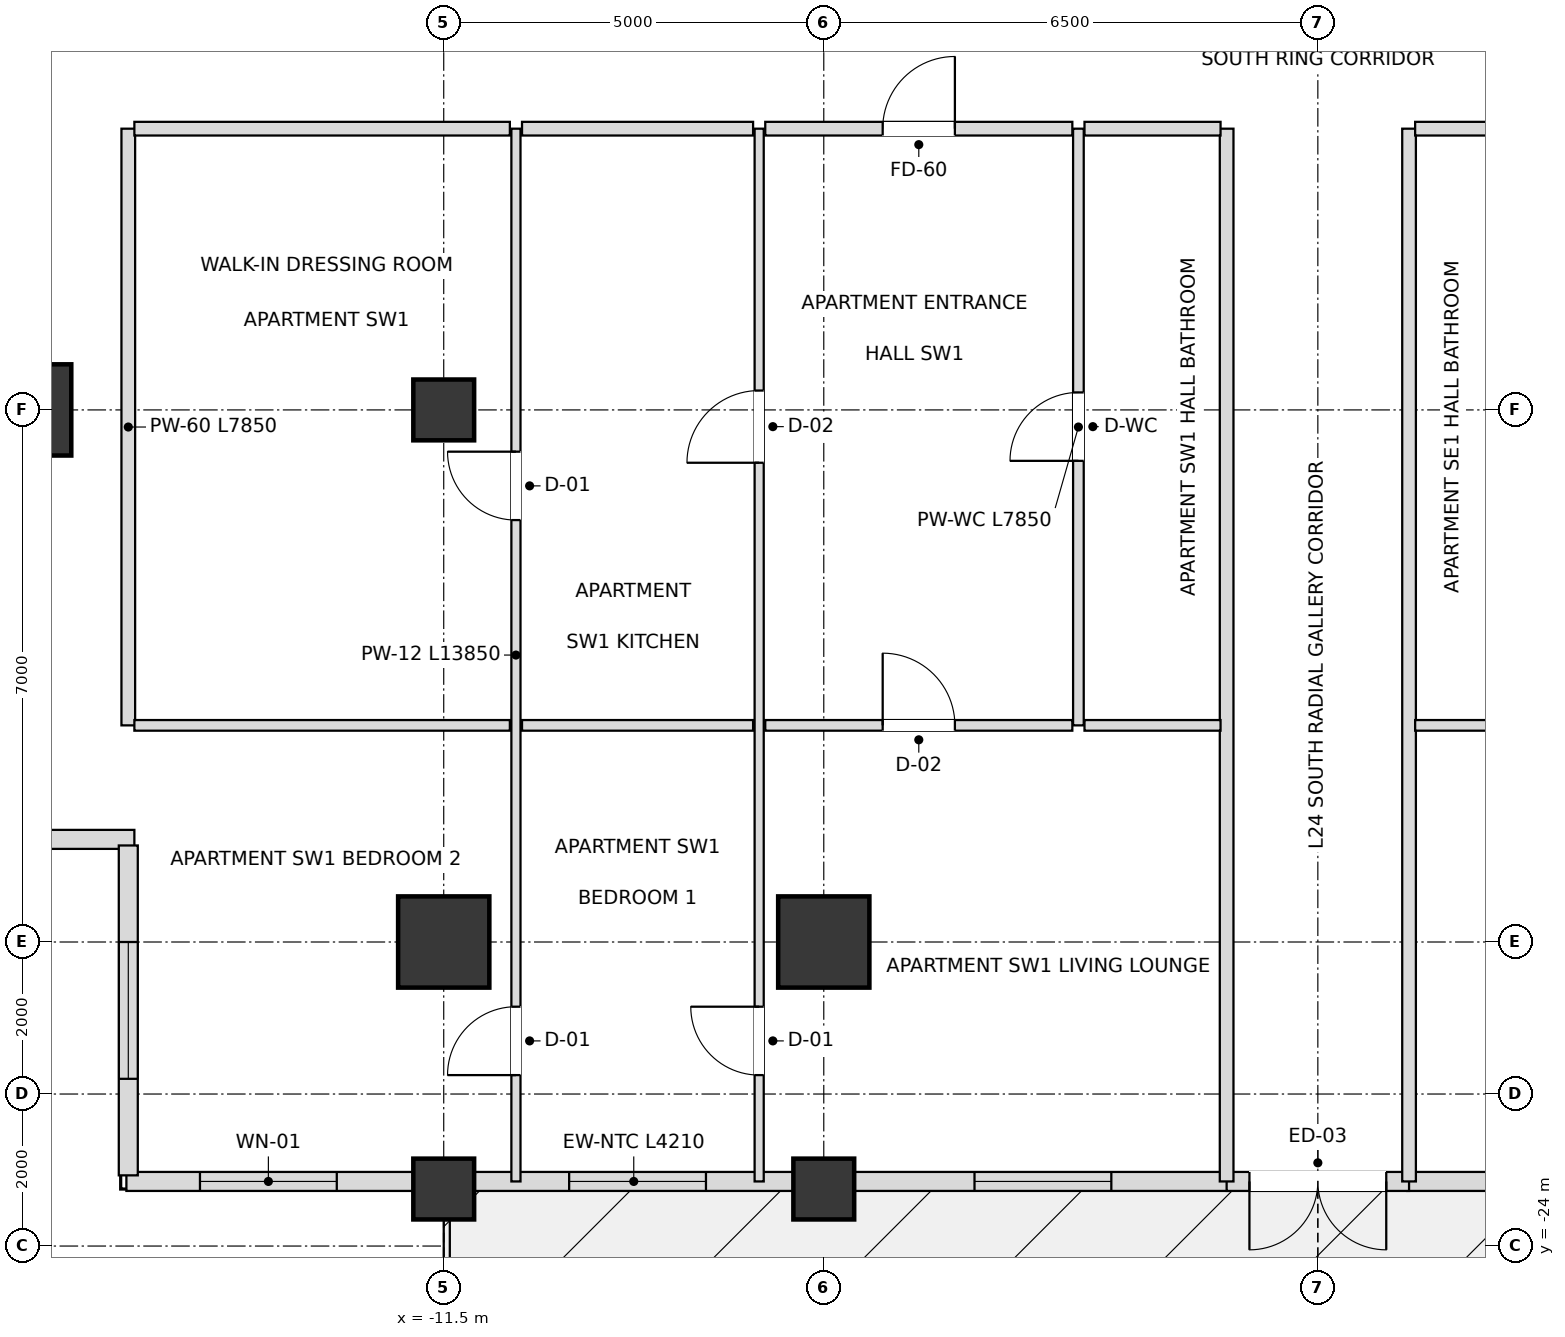
"""IFC4 building model, lengths in metres.
Left out: names, types, materials, properties, quantities, classifications, styles, units other than length and angle.
Written with IfcOpenShell. Run it as: python <this file> out.ifc"""

import sys

from ifc_helpers import new_model, si_unit, direction, frame, frame_2d, origin, origin_2d, place, context, subcontext, project, spatial, rectangle, extrude, element, fill, save


model = new_model("IFC4")
c1 = context("Model", 3, precision=1e-05, world=origin(), true_north=direction((0.0, 1.0)))
c2 = subcontext(c1, "Body", "Model", "MODEL_VIEW")
j1 = project(units=[si_unit("LENGTHUNIT", "METRE"), si_unit("PLANEANGLEUNIT", "RADIAN")], contexts=[c1])
p1 = place(None, origin())
s1 = spatial("IfcSite", under=j1, at=p1, CompositionType="ELEMENT")
p2 = place(p1, origin())
s2 = spatial("IfcBuilding", under=s1, at=p2, CompositionType="ELEMENT")
p3 = place(p2, frame((0.0, 0.0, 99.0)))
s3 = spatial("IfcBuildingStorey", under=s2, at=p3, CompositionType="ELEMENT", Elevation=99.0)
for number, where, z_axis, x_axis in (
    (1, (-11.5, -20.0, 0.0), (0.0, 0.0, 1.0), (1.0, 0.0, 0.0)),
    (2, (-6.5, -20.0, 0.0), (0.0, 0.0, 1.0), (1.0, 0.0, 0.0)),
    (3, (-17.0, -13.0, 0.0), (0.0, 0.0, 1.0), (1.0, 0.0, 0.0)),
):
    element("IfcColumn", number, at=place(p3, frame(where, z_axis=z_axis, x_axis=x_axis)), inside=s3, PredefinedType="USERDEFINED", context=c2, shape_type="SweptSolid", body=[
        extrude(rectangle(XDim=1.2, YDim=1.2, at=origin_2d()), origin(), (0.0, 0.0, 1.0), 3.6),
    ])
for number, where, z_axis, x_axis in (
    (4, (-11.5, -13.0, 0.0), (0.0, 0.0, 1.0), (1.0, 0.0, 0.0)),
    (5, (-11.5, -23.25, 0.0), (0.0, 0.0, 1.0), (1.0, 0.0, 0.0)),
    (6, (-6.5, -23.25, 0.0), (0.0, 0.0, 1.0), (1.0, 0.0, 0.0)),
):
    element("IfcColumn", number, at=place(p3, frame(where, z_axis=z_axis, x_axis=x_axis)), inside=s3, PredefinedType="COLUMN", context=c2, shape_type="SweptSolid", body=[
        extrude(rectangle(XDim=0.8, YDim=0.8, at=origin_2d()), origin(), (0.0, 0.0, 1.0), 3.6),
    ])
p4 = place(p3, frame((-15.675, -23.15, 0.0), z_axis=(0.0, 0.0, 1.0), x_axis=(1.0, 0.0, 0.0)))
e7 = element("IfcWall", 7, at=p4, inside=s3, PredefinedType="SOLIDWALL", context=c2, shape_type="SweptSolid", body=[
    extrude(rectangle(XDim=3.78, YDim=0.25, at=frame_2d((1.89, 0.0))), origin(), (0.0, 0.0, 1.0), 2.736),
])
p5 = place(p4, frame((0.968, 0.0, 0.72)))
e8 = element("IfcOpeningElement", 8, at=p5, cuts=e7, PredefinedType="OPENING", context=c2, shape_type="SweptSolid", body=[
    extrude(rectangle(XDim=1.8, YDim=1.68, at=frame_2d((0.9, 0.84))), frame((0.0, 0.135, 0.0), z_axis=(0.0, -1.0, 0.0), x_axis=(1.0, 0.0, 0.0)), (0.0, 0.0, 1.0), 0.27),
])
p6 = place(p3, frame((-11.105, -23.15, 0.0), z_axis=(0.0, 0.0, 1.0), x_axis=(1.0, 0.0, 0.0)))
e9 = element("IfcWall", 9, at=p6, inside=s3, PredefinedType="SOLIDWALL", context=c2, shape_type="SweptSolid", body=[
    extrude(rectangle(XDim=4.21, YDim=0.25, at=frame_2d((2.105, 0.0))), origin(), (0.0, 0.0, 1.0), 2.736),
])
p7 = place(p6, frame((1.255, 0.0, 0.72)))
e10 = element("IfcOpeningElement", 10, at=p7, cuts=e9, PredefinedType="OPENING", context=c2, shape_type="SweptSolid", body=[
    extrude(rectangle(XDim=1.8, YDim=1.68, at=frame_2d((0.9, 0.84))), frame((0.0, 0.135, 0.0), z_axis=(0.0, -1.0, 0.0), x_axis=(1.0, 0.0, 0.0)), (0.0, 0.0, 1.0), 0.27),
])
p8 = place(p3, frame((-6.105, -23.15, 0.0), z_axis=(0.0, 0.0, 1.0), x_axis=(1.0, 0.0, 0.0)))
e11 = element("IfcWall", 11, at=p8, inside=s3, PredefinedType="SOLIDWALL", context=c2, shape_type="SweptSolid", body=[
    extrude(rectangle(XDim=4.93, YDim=0.25, at=frame_2d((2.465, 0.0))), origin(), (0.0, 0.0, 1.0), 2.736),
])
p9 = place(p8, frame((1.588, 0.0, 0.72)))
e12 = element("IfcOpeningElement", 12, at=p9, cuts=e11, PredefinedType="OPENING", context=c2, shape_type="SweptSolid", body=[
    extrude(rectangle(XDim=1.8, YDim=1.68, at=frame_2d((0.9, 0.84))), frame((0.0, 0.135, 0.0), z_axis=(0.0, -1.0, 0.0), x_axis=(1.0, 0.0, 0.0)), (0.0, 0.0, 1.0), 0.27),
])
p10 = place(p3, frame((1.175, -23.15, 0.0), z_axis=(0.0, 0.0, 1.0), x_axis=(1.0, 0.0, 0.0)))
e13 = element("IfcWall", 13, at=p10, inside=s3, PredefinedType="SOLIDWALL", context=c2, shape_type="SweptSolid", body=[
    extrude(rectangle(XDim=4.93, YDim=0.25, at=frame_2d((2.465, 0.0))), origin(), (0.0, 0.0, 1.0), 2.736),
])
p11 = place(p10, frame((1.543, 0.0, 0.72)))
e14 = element("IfcOpeningElement", 14, at=p11, cuts=e13, PredefinedType="OPENING", context=c2, shape_type="SweptSolid", body=[
    extrude(rectangle(XDim=1.8, YDim=1.68, at=frame_2d((0.9, 0.84))), frame((0.0, 0.135, 0.0), z_axis=(0.0, -1.0, 0.0), x_axis=(1.0, 0.0, 0.0)), (0.0, 0.0, 1.0), 0.27),
])
p12 = place(p3, frame((1.2, -23.15, 0.0), z_axis=(0.0, 0.0, 1.0), x_axis=(-1.0, 0.0, 0.0)))
e15 = element("IfcWall", 15, at=p12, inside=s3, PredefinedType="SOLIDWALL", context=c2, shape_type="SweptSolid", body=[
    extrude(rectangle(XDim=2.4, YDim=0.25, at=frame_2d((1.2, 0.0))), origin(), (0.0, 0.0, 1.0), 2.736),
])
p13 = place(p12, frame((0.3, 0.0, 0.0)))
e16 = element("IfcOpeningElement", 16, at=p13, cuts=e15, PredefinedType="OPENING", context=c2, shape_type="SweptSolid", body=[
    extrude(rectangle(XDim=1.8, YDim=2.3, at=frame_2d((0.9, 1.15))), frame((0.0, 0.135, 0.0), z_axis=(0.0, -1.0, 0.0), x_axis=(1.0, 0.0, 0.0)), (0.0, 0.0, 1.0), 0.27),
])
p14 = place(p3, frame((-20.23, -18.65, 0.0), z_axis=(0.0, 0.0, 1.0), x_axis=(1.0, 0.0, 0.0)))
e17 = element("IfcWall", 17, at=p14, inside=s3, PredefinedType="SOLIDWALL", context=c2, shape_type="SweptSolid", body=[
    extrude(rectangle(XDim=4.66, YDim=0.25, at=frame_2d((2.33, 0.0))), origin(), (0.0, 0.0, 1.0), 2.736),
])
p15 = place(p14, frame((1.43, 0.0, 0.72)))
e18 = element("IfcOpeningElement", 18, at=p15, cuts=e17, PredefinedType="OPENING", context=c2, shape_type="SweptSolid", body=[
    extrude(rectangle(XDim=1.8, YDim=1.68, at=frame_2d((0.9, 0.84))), frame((0.0, 0.135, 0.0), z_axis=(0.0, -1.0, 0.0), x_axis=(1.0, 0.0, 0.0)), (0.0, 0.0, 1.0), 0.27),
])
p16 = place(p3, frame((-15.65, -18.73, 0.0), z_axis=(0.0, 0.0, 1.0), x_axis=(0.0, -1.0, 0.0)))
e19 = element("IfcWall", 19, at=p16, inside=s3, PredefinedType="SOLIDWALL", context=c2, shape_type="SweptSolid", body=[
    extrude(rectangle(XDim=4.34, YDim=0.25, at=frame_2d((2.17, 0.0))), origin(), (0.0, 0.0, 1.0), 2.736),
])
p17 = place(p16, frame((1.27, 0.0, 0.72)))
e20 = element("IfcOpeningElement", 20, at=p17, cuts=e19, PredefinedType="OPENING", context=c2, shape_type="SweptSolid", body=[
    extrude(rectangle(XDim=1.8, YDim=1.68, at=frame_2d((0.9, 0.84))), frame((0.0, 0.135, 0.0), z_axis=(0.0, -1.0, 0.0), x_axis=(1.0, 0.0, 0.0)), (0.0, 0.0, 1.0), 0.27),
])
p18 = place(p3, frame((-15.65, -17.15, 0.0), z_axis=(0.0, 0.0, 1.0), x_axis=(0.0, 1.0, 0.0)))
e21 = element("IfcWall", 21, at=p18, inside=s3, PredefinedType="PARTITIONING", context=c2, shape_type="SweptSolid", body=[
    extrude(rectangle(XDim=7.85, YDim=0.18, at=frame_2d((3.925, 0.0))), origin(), (0.0, 0.0, 1.0), 2.736),
])
p19 = place(p3, frame((-10.55, -23.15, 0.0), z_axis=(0.0, 0.0, 1.0), x_axis=(0.0, 1.0, 0.0)))
e22 = element("IfcWall", 22, at=p19, inside=s3, PredefinedType="PARTITIONING", context=c2, shape_type="SweptSolid", body=[
    extrude(rectangle(XDim=13.85, YDim=0.12, at=frame_2d((6.925, 0.0))), origin(), (0.0, 0.0, 1.0), 2.816),
])
p20 = place(p19, frame((8.701, 0.0, 0.0)))
e23 = element("IfcOpeningElement", 23, at=p20, cuts=e22, PredefinedType="OPENING", context=c2, shape_type="SweptSolid", body=[
    extrude(rectangle(XDim=0.9, YDim=2.1, at=frame_2d((0.45, 1.05))), frame((0.0, 0.07, 0.0), z_axis=(0.0, -1.0, 0.0), x_axis=(1.0, 0.0, 0.0)), (0.0, 0.0, 1.0), 0.14),
])
p21 = place(p19, frame((1.399, 0.0, 0.0)))
e24 = element("IfcOpeningElement", 24, at=p21, cuts=e22, PredefinedType="OPENING", context=c2, shape_type="SweptSolid", body=[
    extrude(rectangle(XDim=0.9, YDim=2.1, at=frame_2d((0.45, 1.05))), frame((0.0, 0.07, 0.0), z_axis=(0.0, -1.0, 0.0), x_axis=(1.0, 0.0, 0.0)), (0.0, 0.0, 1.0), 0.14),
])
p22 = place(p3, frame((-7.35, -23.15, 0.0), z_axis=(0.0, 0.0, 1.0), x_axis=(0.0, 1.0, 0.0)))
e25 = element("IfcWall", 25, at=p22, inside=s3, PredefinedType="PARTITIONING", context=c2, shape_type="SweptSolid", body=[
    extrude(rectangle(XDim=13.85, YDim=0.12, at=frame_2d((6.925, 0.0))), origin(), (0.0, 0.0, 1.0), 2.816),
])
p23 = place(p22, frame((9.455, 0.0, 0.0)))
e26 = element("IfcOpeningElement", 26, at=p23, cuts=e25, PredefinedType="OPENING", context=c2, shape_type="SweptSolid", body=[
    extrude(rectangle(XDim=0.95, YDim=2.1, at=frame_2d((0.475, 1.05))), frame((0.0, 0.07, 0.0), z_axis=(0.0, -1.0, 0.0), x_axis=(1.0, 0.0, 0.0)), (0.0, 0.0, 1.0), 0.14),
])
p24 = place(p22, frame((1.399, 0.0, 0.0)))
e27 = element("IfcOpeningElement", 27, at=p24, cuts=e25, PredefinedType="OPENING", context=c2, shape_type="SweptSolid", body=[
    extrude(rectangle(XDim=0.9, YDim=2.1, at=frame_2d((0.45, 1.05))), frame((0.0, 0.07, 0.0), z_axis=(0.0, -1.0, 0.0), x_axis=(1.0, 0.0, 0.0)), (0.0, 0.0, 1.0), 0.14),
])
p25 = place(p3, frame((-3.15, -17.15, 0.0), z_axis=(0.0, 0.0, 1.0), x_axis=(0.0, 1.0, 0.0)))
e28 = element("IfcWall", 28, at=p25, inside=s3, PredefinedType="PARTITIONING", context=c2, shape_type="SweptSolid", body=[
    extrude(rectangle(XDim=7.85, YDim=0.14, at=frame_2d((3.925, 0.0))), origin(), (0.0, 0.0, 1.0), 3.38),
])
p26 = place(p25, frame((3.48, 0.0, 0.0)))
e29 = element("IfcOpeningElement", 29, at=p26, cuts=e28, PredefinedType="OPENING", context=c2, shape_type="SweptSolid", body=[
    extrude(rectangle(XDim=0.9, YDim=2.1, at=frame_2d((0.45, 1.05))), frame((0.0, 0.08, 0.0), z_axis=(0.0, -1.0, 0.0), x_axis=(1.0, 0.0, 0.0)), (0.0, 0.0, 1.0), 0.16),
])
for number, where, z_axis, x_axis in (
    (30, (-1.2, -23.15, 0.0), (0.0, 0.0, 1.0), (0.0, 1.0, 0.0)),
    (31, (1.2, -23.15, 0.0), (0.0, 0.0, 1.0), (0.0, 1.0, 0.0)),
):
    element("IfcWall", number, at=place(p3, frame(where, z_axis=z_axis, x_axis=x_axis)), inside=s3, PredefinedType="PARTITIONING", context=c2, shape_type="SweptSolid", body=[
        extrude(rectangle(XDim=13.85, YDim=0.18, at=frame_2d((6.925, 0.0))), origin(), (0.0, 0.0, 1.0), 2.816),
    ])
p27 = place(p3, frame((-15.57, -17.15, 0.0), z_axis=(0.0, 0.0, 1.0), x_axis=(1.0, 0.0, 0.0)))
e32 = element("IfcWall", 32, at=p27, inside=s3, PredefinedType="PARTITIONING", context=c2, shape_type="SweptSolid", body=[
    extrude(rectangle(XDim=4.94, YDim=0.14, at=frame_2d((2.47, 0.0))), origin(), (0.0, 0.0, 1.0), 2.736),
])
p28 = place(p3, frame((-10.47, -17.15, 0.0), z_axis=(0.0, 0.0, 1.0), x_axis=(1.0, 0.0, 0.0)))
e33 = element("IfcWall", 33, at=p28, inside=s3, PredefinedType="PARTITIONING", context=c2, shape_type="SweptSolid", body=[
    extrude(rectangle(XDim=3.04, YDim=0.14, at=frame_2d((1.52, 0.0))), origin(), (0.0, 0.0, 1.0), 3.38),
])
p29 = place(p3, frame((-7.27, -17.15, 0.0), z_axis=(0.0, 0.0, 1.0), x_axis=(1.0, 0.0, 0.0)))
e34 = element("IfcWall", 34, at=p29, inside=s3, PredefinedType="PARTITIONING", context=c2, shape_type="SweptSolid", body=[
    extrude(rectangle(XDim=4.04, YDim=0.14, at=frame_2d((2.02, 0.0))), origin(), (0.0, 0.0, 1.0), 2.816),
])
p30 = place(p29, frame((1.545, 0.0, 0.0)))
e35 = element("IfcOpeningElement", 35, at=p30, cuts=e34, PredefinedType="OPENING", context=c2, shape_type="SweptSolid", body=[
    extrude(rectangle(XDim=0.95, YDim=2.1, at=frame_2d((0.475, 1.05))), frame((0.0, 0.08, 0.0), z_axis=(0.0, -1.0, 0.0), x_axis=(1.0, 0.0, 0.0)), (0.0, 0.0, 1.0), 0.16),
])
for number, where, z_axis, x_axis in (
    (36, (-3.07, -17.15, 0.0), (0.0, 0.0, 1.0), (1.0, 0.0, 0.0)),
    (37, (1.28, -17.15, 0.0), (0.0, 0.0, 1.0), (1.0, 0.0, 0.0)),
):
    element("IfcWall", number, at=place(p3, frame(where, z_axis=z_axis, x_axis=x_axis)), inside=s3, PredefinedType="PARTITIONING", context=c2, shape_type="SweptSolid", body=[
        extrude(rectangle(XDim=1.79, YDim=0.14, at=frame_2d((0.895, 0.0))), origin(), (0.0, 0.0, 1.0), 3.38),
    ])
p31 = place(p3, frame((-15.57, -9.3, 0.0), z_axis=(0.0, 0.0, 1.0), x_axis=(1.0, 0.0, 0.0)))
e38 = element("IfcWall", 38, at=p31, inside=s3, PredefinedType="PARTITIONING", context=c2, shape_type="SweptSolid", body=[
    extrude(rectangle(XDim=4.94, YDim=0.18, at=frame_2d((2.47, 0.0))), origin(), (0.0, 0.0, 1.0), 3.38),
])
p32 = place(p3, frame((-10.47, -9.3, 0.0), z_axis=(0.0, 0.0, 1.0), x_axis=(1.0, 0.0, 0.0)))
e39 = element("IfcWall", 39, at=p32, inside=s3, PredefinedType="PARTITIONING", context=c2, shape_type="SweptSolid", body=[
    extrude(rectangle(XDim=3.04, YDim=0.18, at=frame_2d((1.52, 0.0))), origin(), (0.0, 0.0, 1.0), 3.38),
])
p33 = place(p3, frame((-7.27, -9.3, 0.0), z_axis=(0.0, 0.0, 1.0), x_axis=(1.0, 0.0, 0.0)))
e40 = element("IfcWall", 40, at=p33, inside=s3, PredefinedType="PARTITIONING", context=c2, shape_type="SweptSolid", body=[
    extrude(rectangle(XDim=4.04, YDim=0.18, at=frame_2d((2.02, 0.0))), origin(), (0.0, 0.0, 1.0), 2.816),
])
p34 = place(p33, frame((1.545, 0.0, 0.0)))
e41 = element("IfcOpeningElement", 41, at=p34, cuts=e40, PredefinedType="OPENING", context=c2, shape_type="SweptSolid", body=[
    extrude(rectangle(XDim=0.95, YDim=2.15, at=frame_2d((0.475, 1.075))), frame((0.0, 0.1, 0.0), z_axis=(0.0, -1.0, 0.0), x_axis=(1.0, 0.0, 0.0)), (0.0, 0.0, 1.0), 0.2),
])
for number, where, z_axis, x_axis in (
    (42, (-3.07, -9.3, 0.0), (0.0, 0.0, 1.0), (1.0, 0.0, 0.0)),
    (43, (1.28, -9.3, 0.0), (0.0, 0.0, 1.0), (1.0, 0.0, 0.0)),
):
    element("IfcWall", number, at=place(p3, frame(where, z_axis=z_axis, x_axis=x_axis)), inside=s3, PredefinedType="PARTITIONING", context=c2, shape_type="SweptSolid", body=[
        extrude(rectangle(XDim=1.79, YDim=0.18, at=frame_2d((0.895, 0.0))), origin(), (0.0, 0.0, 1.0), 3.38),
    ])
p35 = place(p5, origin())
e44 = element("IfcWindow", 44, at=p35, inside=s3, PartitioningType="SINGLE_PANEL", PredefinedType="WINDOW", context=c2, shape_type="SweptSolid", body=[
    extrude(rectangle(XDim=1.8, YDim=1.68, at=frame_2d((0.9, 0.84))), frame((0.0, 0.03, 0.0), z_axis=(0.0, -1.0, 0.0), x_axis=(1.0, 0.0, 0.0)), (0.0, 0.0, 1.0), 0.06),
])
fill(e8, e44)
p36 = place(p7, origin())
e45 = element("IfcWindow", 45, at=p36, inside=s3, PartitioningType="SINGLE_PANEL", PredefinedType="WINDOW", context=c2, shape_type="SweptSolid", body=[
    extrude(rectangle(XDim=1.8, YDim=1.68, at=frame_2d((0.9, 0.84))), frame((0.0, 0.03, 0.0), z_axis=(0.0, -1.0, 0.0), x_axis=(1.0, 0.0, 0.0)), (0.0, 0.0, 1.0), 0.06),
])
fill(e10, e45)
p37 = place(p9, origin())
e46 = element("IfcWindow", 46, at=p37, inside=s3, PartitioningType="SINGLE_PANEL", PredefinedType="WINDOW", context=c2, shape_type="SweptSolid", body=[
    extrude(rectangle(XDim=1.8, YDim=1.68, at=frame_2d((0.9, 0.84))), frame((0.0, 0.03, 0.0), z_axis=(0.0, -1.0, 0.0), x_axis=(1.0, 0.0, 0.0)), (0.0, 0.0, 1.0), 0.06),
])
fill(e12, e46)
p38 = place(p13, origin())
e47 = element("IfcDoor", 47, at=p38, inside=s3, OperationType="DOUBLE_DOOR_SINGLE_SWING", PredefinedType="DOOR", context=c2, shape_type="SweptSolid", body=[
    extrude(rectangle(XDim=1.8, YDim=2.3, at=frame_2d((0.9, 1.15))), frame((0.0, 0.025, 0.0), z_axis=(0.0, -1.0, 0.0), x_axis=(1.0, 0.0, 0.0)), (0.0, 0.0, 1.0), 0.05),
])
fill(e16, e47)
p39 = place(p17, origin())
e48 = element("IfcWindow", 48, at=p39, inside=s3, PartitioningType="SINGLE_PANEL", PredefinedType="WINDOW", context=c2, shape_type="SweptSolid", body=[
    extrude(rectangle(XDim=1.8, YDim=1.68, at=frame_2d((0.9, 0.84))), frame((0.0, 0.03, 0.0), z_axis=(0.0, -1.0, 0.0), x_axis=(1.0, 0.0, 0.0)), (0.0, 0.0, 1.0), 0.06),
])
fill(e20, e48)
p40 = place(p26, origin())
e49 = element("IfcDoor", 49, at=p40, inside=s3, OperationType="SINGLE_SWING_LEFT", PredefinedType="DOOR", context=c2, shape_type="SweptSolid", body=[
    extrude(rectangle(XDim=0.9, YDim=2.1, at=frame_2d((0.45, 1.05))), frame((0.0, 0.025, 0.0), z_axis=(0.0, -1.0, 0.0), x_axis=(1.0, 0.0, 0.0)), (0.0, 0.0, 1.0), 0.05),
])
fill(e29, e49)
p41 = place(p34, origin())
e50 = element("IfcDoor", 50, at=p41, inside=s3, OperationType="SINGLE_SWING_RIGHT", PredefinedType="DOOR", context=c2, shape_type="SweptSolid", body=[
    extrude(rectangle(XDim=0.95, YDim=2.15, at=frame_2d((0.475, 1.075))), frame((0.0, 0.025, 0.0), z_axis=(0.0, -1.0, 0.0), x_axis=(1.0, 0.0, 0.0)), (0.0, 0.0, 1.0), 0.05),
])
fill(e41, e50)
p42 = place(p23, origin())
e51 = element("IfcDoor", 51, at=p42, inside=s3, OperationType="SINGLE_SWING_LEFT", PredefinedType="DOOR", context=c2, shape_type="SweptSolid", body=[
    extrude(rectangle(XDim=0.95, YDim=2.1, at=frame_2d((0.475, 1.05))), frame((0.0, 0.025, 0.0), z_axis=(0.0, -1.0, 0.0), x_axis=(1.0, 0.0, 0.0)), (0.0, 0.0, 1.0), 0.05),
])
fill(e26, e51)
p43 = place(p20, origin())
e52 = element("IfcDoor", 52, at=p43, inside=s3, OperationType="SINGLE_SWING_RIGHT", PredefinedType="DOOR", context=c2, shape_type="SweptSolid", body=[
    extrude(rectangle(XDim=0.9, YDim=2.1, at=frame_2d((0.45, 1.05))), frame((0.0, 0.025, 0.0), z_axis=(0.0, -1.0, 0.0), x_axis=(1.0, 0.0, 0.0)), (0.0, 0.0, 1.0), 0.05),
])
fill(e23, e52)
p44 = place(p30, origin())
e53 = element("IfcDoor", 53, at=p44, inside=s3, OperationType="SINGLE_SWING_LEFT", PredefinedType="DOOR", context=c2, shape_type="SweptSolid", body=[
    extrude(rectangle(XDim=0.95, YDim=2.1, at=frame_2d((0.475, 1.05))), frame((0.0, 0.025, 0.0), z_axis=(0.0, -1.0, 0.0), x_axis=(1.0, 0.0, 0.0)), (0.0, 0.0, 1.0), 0.05),
])
fill(e35, e53)
p45 = place(p24, origin())
e54 = element("IfcDoor", 54, at=p45, inside=s3, OperationType="SINGLE_SWING_RIGHT", PredefinedType="DOOR", context=c2, shape_type="SweptSolid", body=[
    extrude(rectangle(XDim=0.9, YDim=2.1, at=frame_2d((0.45, 1.05))), frame((0.0, 0.025, 0.0), z_axis=(0.0, -1.0, 0.0), x_axis=(1.0, 0.0, 0.0)), (0.0, 0.0, 1.0), 0.05),
])
fill(e27, e54)
p46 = place(p21, origin())
e55 = element("IfcDoor", 55, at=p46, inside=s3, OperationType="SINGLE_SWING_LEFT", PredefinedType="DOOR", context=c2, shape_type="SweptSolid", body=[
    extrude(rectangle(XDim=0.9, YDim=2.1, at=frame_2d((0.45, 1.05))), frame((0.0, 0.025, 0.0), z_axis=(0.0, -1.0, 0.0), x_axis=(1.0, 0.0, 0.0)), (0.0, 0.0, 1.0), 0.05),
])
fill(e24, e55)
save(model, sys.argv[1])
